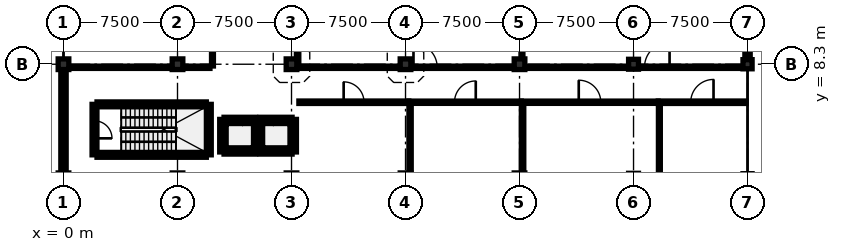
"""IFC4 building model, lengths in metres.
Left out: names, types, materials, properties, quantities, classifications, styles, units other than length and angle.
Written with IfcOpenShell. Run it as: python <this file> out.ifc"""

import sys

from ifc_helpers import new_model, si_unit, direction, frame, frame_2d, origin, origin_2d, place, context, subcontext, project, spatial, rectangle, extrude, element, fill, save


model = new_model("IFC4")
c1 = context("Model", 3, precision=1e-05, world=origin(), true_north=direction((0.0, 1.0)))
c2 = subcontext(c1, "Body", "Model", "MODEL_VIEW")
j1 = project(units=[si_unit("LENGTHUNIT", "METRE"), si_unit("PLANEANGLEUNIT", "RADIAN")], contexts=[c1])
p1 = place(None, origin())
s1 = spatial("IfcSite", under=j1, at=p1, CompositionType="ELEMENT")
p2 = place(p1, origin())
s2 = spatial("IfcBuilding", under=s1, at=p2, CompositionType="ELEMENT")
p3 = place(p2, frame((0.0, 0.0, 5.0)))
s3 = spatial("IfcBuildingStorey", under=s2, at=p3, CompositionType="ELEMENT", Elevation=5.0)
for number, where, z_axis, x_axis in (
    (1, (0.0, 8.3, 0.0), (0.0, 0.0, 1.0), (1.0, 0.0, 0.0)),
    (2, (7.5, 8.3, 0.0), (0.0, 0.0, 1.0), (1.0, 0.0, 0.0)),
    (3, (15.0, 8.3, 0.0), (0.0, 0.0, 1.0), (1.0, 0.0, 0.0)),
    (4, (22.5, 8.3, 0.0), (0.0, 0.0, 1.0), (1.0, 0.0, 0.0)),
    (5, (30.0, 8.3, 0.0), (0.0, 0.0, 1.0), (1.0, 0.0, 0.0)),
):
    element("IfcColumn", number, at=place(p3, frame(where, z_axis=z_axis, x_axis=x_axis)), inside=s3, PredefinedType="COLUMN", context=c2, shape_type="SweptSolid", body=[
        extrude(rectangle(XDim=0.7, YDim=0.7, at=origin_2d()), origin(), (0.0, 0.0, 1.0), 4.2),
    ])
p4 = place(p3, frame((37.5, 8.3, 0.0), z_axis=(0.0, 0.0, 1.0), x_axis=(1.0, 0.0, 0.0)))
e6 = element("IfcColumn", 6, at=p4, inside=s3, PredefinedType="COLUMN", context=c2, shape_type="SweptSolid", body=[
    extrude(rectangle(XDim=0.65, YDim=0.65, at=origin_2d()), origin(), (0.0, 0.0, 1.0), 4.2),
])
p5 = place(p3, frame((45.0, 8.3, 0.0), z_axis=(0.0, 0.0, 1.0), x_axis=(1.0, 0.0, 0.0)))
e7 = element("IfcColumn", 7, at=p5, inside=s3, PredefinedType="COLUMN", context=c2, shape_type="SweptSolid", body=[
    extrude(rectangle(XDim=0.6, YDim=0.6, at=origin_2d()), origin(), (0.0, 0.0, 1.0), 4.2),
])
p6 = place(p3, frame((45.0, 30.5, 0.0), z_axis=(0.0, 0.0, 1.0), x_axis=(0.0, -1.0, 0.0)))
e8 = element("IfcWall", 8, at=p6, inside=s3, PredefinedType="SOLIDWALL", context=c2, shape_type="SweptSolid", body=[
    extrude(rectangle(XDim=21.9, YDim=0.35, at=frame_2d((10.95, 0.0))), origin(), (0.0, 0.0, 1.0), 3.485),
])
p7 = place(p3, frame((0.0, 1.15, 0.0), z_axis=(0.0, 0.0, 1.0), x_axis=(0.0, 1.0, 0.0)))
e9 = element("IfcWall", 9, at=p7, inside=s3, PredefinedType="SOLIDWALL", context=c2, shape_type="SweptSolid", body=[
    extrude(rectangle(XDim=6.8, YDim=0.35, at=frame_2d((3.4, 0.0))), origin(), (0.0, 0.0, 1.0), 3.535),
])
p8 = place(p3, frame((2.205, 2.34, 0.0), z_axis=(0.0, 0.0, 1.0), x_axis=(1.0, 0.0, 0.0)))
e10 = element("IfcWall", 10, at=p8, inside=s3, PredefinedType="SHEAR", context=c2, shape_type="SweptSolid", body=[
    extrude(rectangle(XDim=7.19, YDim=0.32, at=frame_2d((3.595, 0.0))), origin(), (0.0, 0.0, 1.0), 4.2),
])
p9 = place(p3, frame((9.56, 2.34, 0.0), z_axis=(0.0, 0.0, 1.0), x_axis=(0.0, 1.0, 0.0)))
e11 = element("IfcWall", 11, at=p9, inside=s3, PredefinedType="SHEAR", context=c2, shape_type="SweptSolid", body=[
    extrude(rectangle(XDim=3.32, YDim=0.32, at=frame_2d((1.66, 0.0))), origin(), (0.0, 0.0, 1.0), 4.2),
])
p10 = place(p3, frame((9.395, 5.66, 0.0), z_axis=(0.0, 0.0, 1.0), x_axis=(-1.0, 0.0, 0.0)))
e12 = element("IfcWall", 12, at=p10, inside=s3, PredefinedType="SHEAR", context=c2, shape_type="SweptSolid", body=[
    extrude(rectangle(XDim=7.19, YDim=0.32, at=frame_2d((3.595, 0.0))), origin(), (0.0, 0.0, 1.0), 4.2),
])
p11 = place(p3, frame((2.04, 5.66, 0.0), z_axis=(0.0, 0.0, 1.0), x_axis=(0.0, -1.0, 0.0)))
e13 = element("IfcWall", 13, at=p11, inside=s3, PredefinedType="SHEAR", context=c2, shape_type="SweptSolid", body=[
    extrude(rectangle(XDim=3.32, YDim=0.32, at=frame_2d((1.66, 0.0))), origin(), (0.0, 0.0, 1.0), 4.2),
])
p12 = place(p11, frame((1.085, 0.0, 0.0)))
e14 = element("IfcOpeningElement", 14, at=p12, cuts=e13, PredefinedType="OPENING", context=c2, shape_type="SweptSolid", body=[
    extrude(rectangle(XDim=1.15, YDim=2.15, at=frame_2d((0.575, 1.075))), frame((0.0, 0.172, 0.0), z_axis=(0.0, -1.0, 0.0), x_axis=(1.0, 0.0, 0.0)), (0.0, 0.0, 1.0), 0.344),
])
p13 = place(p3, frame((10.562, 2.529, 0.0), z_axis=(0.0, 0.0, 1.0), x_axis=(1.0, 0.0, 0.0)))
e15 = element("IfcWall", 15, at=p13, inside=s3, PredefinedType="SHEAR", context=c2, shape_type="SweptSolid", body=[
    extrude(rectangle(XDim=2.077, YDim=0.28, at=frame_2d((1.039, 0.0))), origin(), (0.0, 0.0, 1.0), 4.2),
])
p14 = place(p3, frame((12.783, 2.529, 0.0), z_axis=(0.0, 0.0, 1.0), x_axis=(0.0, 1.0, 0.0)))
e16 = element("IfcWall", 16, at=p14, inside=s3, PredefinedType="SHEAR", context=c2, shape_type="SweptSolid", body=[
    extrude(rectangle(XDim=2.141, YDim=0.28, at=frame_2d((1.071, 0.0))), origin(), (0.0, 0.0, 1.0), 4.2),
])
p15 = place(p3, frame((12.638, 4.671, 0.0), z_axis=(0.0, 0.0, 1.0), x_axis=(-1.0, 0.0, 0.0)))
e17 = element("IfcWall", 17, at=p15, inside=s3, PredefinedType="SHEAR", context=c2, shape_type="SweptSolid", body=[
    extrude(rectangle(XDim=2.077, YDim=0.28, at=frame_2d((1.039, 0.0))), origin(), (0.0, 0.0, 1.0), 4.2),
])
p16 = place(p15, frame((0.489, 0.0, 0.0)))
e18 = element("IfcOpeningElement", 18, at=p16, cuts=e17, PredefinedType="OPENING", context=c2, shape_type="SweptSolid", body=[
    extrude(rectangle(XDim=1.1, YDim=2.15, at=frame_2d((0.55, 1.075))), frame((0.0, 0.152, 0.0), z_axis=(0.0, -1.0, 0.0), x_axis=(1.0, 0.0, 0.0)), (0.0, 0.0, 1.0), 0.304),
])
p17 = place(p3, frame((10.417, 4.671, 0.0), z_axis=(0.0, 0.0, 1.0), x_axis=(0.0, -1.0, 0.0)))
e19 = element("IfcWall", 19, at=p17, inside=s3, PredefinedType="SHEAR", context=c2, shape_type="SweptSolid", body=[
    extrude(rectangle(XDim=2.141, YDim=0.28, at=frame_2d((1.071, 0.0))), origin(), (0.0, 0.0, 1.0), 4.2),
])
p18 = place(p3, frame((12.928, 2.529, 0.0), z_axis=(0.0, 0.0, 1.0), x_axis=(1.0, 0.0, 0.0)))
e20 = element("IfcWall", 20, at=p18, inside=s3, PredefinedType="SHEAR", context=c2, shape_type="SweptSolid", body=[
    extrude(rectangle(XDim=2.11, YDim=0.28, at=frame_2d((1.055, 0.0))), origin(), (0.0, 0.0, 1.0), 4.2),
])
p19 = place(p3, frame((15.184, 2.529, 0.0), z_axis=(0.0, 0.0, 1.0), x_axis=(0.0, 1.0, 0.0)))
e21 = element("IfcWall", 21, at=p19, inside=s3, PredefinedType="SHEAR", context=c2, shape_type="SweptSolid", body=[
    extrude(rectangle(XDim=2.141, YDim=0.28, at=frame_2d((1.071, 0.0))), origin(), (0.0, 0.0, 1.0), 4.2),
])
p20 = place(p3, frame((15.039, 4.671, 0.0), z_axis=(0.0, 0.0, 1.0), x_axis=(-1.0, 0.0, 0.0)))
e22 = element("IfcWall", 22, at=p20, inside=s3, PredefinedType="SHEAR", context=c2, shape_type="SweptSolid", body=[
    extrude(rectangle(XDim=2.11, YDim=0.28, at=frame_2d((1.055, 0.0))), origin(), (0.0, 0.0, 1.0), 4.2),
])
p21 = place(p20, frame((0.505, 0.0, 0.0)))
e23 = element("IfcOpeningElement", 23, at=p21, cuts=e22, PredefinedType="OPENING", context=c2, shape_type="SweptSolid", body=[
    extrude(rectangle(XDim=1.1, YDim=2.15, at=frame_2d((0.55, 1.075))), frame((0.0, 0.152, 0.0), z_axis=(0.0, -1.0, 0.0), x_axis=(1.0, 0.0, 0.0)), (0.0, 0.0, 1.0), 0.304),
])
p22 = place(p3, frame((15.485, 5.8, 0.0), z_axis=(0.0, 0.0, 1.0), x_axis=(1.0, 0.0, 0.0)))
e24 = element("IfcWall", 24, at=p22, inside=s3, PredefinedType="PARTITIONING", context=c2, shape_type="SweptSolid", body=[
    extrude(rectangle(XDim=7.23, YDim=0.16, at=frame_2d((3.615, 0.0))), origin(), (0.0, 0.0, 1.0), 3.265),
])
p23 = place(p22, frame((2.945, 0.0, 0.0)))
e25 = element("IfcOpeningElement", 25, at=p23, cuts=e24, PredefinedType="OPENING", context=c2, shape_type="SweptSolid", body=[
    extrude(rectangle(XDim=1.34, YDim=2.24, at=frame_2d((0.67, 1.12))), frame((0.0, 0.092, 0.0), z_axis=(0.0, -1.0, 0.0), x_axis=(1.0, 0.0, 0.0)), (0.0, 0.0, 1.0), 0.184),
])
p24 = place(p3, frame((22.727, 5.8, 0.0), z_axis=(0.0, 0.0, 1.0), x_axis=(1.0, 0.0, 0.0)))
e26 = element("IfcWall", 26, at=p24, inside=s3, PredefinedType="PARTITIONING", context=c2, shape_type="SweptSolid", body=[
    extrude(rectangle(XDim=7.388, YDim=0.15, at=frame_2d((3.694, 0.0))), origin(), (0.0, 0.0, 1.0), 3.265),
])
p25 = place(p24, frame((2.994, 0.0, 0.0)))
e27 = element("IfcOpeningElement", 27, at=p25, cuts=e26, PredefinedType="OPENING", context=c2, shape_type="SweptSolid", body=[
    extrude(rectangle(XDim=1.4, YDim=2.25, at=frame_2d((0.7, 1.125))), frame((0.0, 0.087, 0.0), z_axis=(0.0, -1.0, 0.0), x_axis=(1.0, 0.0, 0.0)), (0.0, 0.0, 1.0), 0.174),
])
p26 = place(p3, frame((30.127, 5.8, 0.0), z_axis=(0.0, 0.0, 1.0), x_axis=(1.0, 0.0, 0.0)))
e28 = element("IfcWall", 28, at=p26, inside=s3, PredefinedType="PARTITIONING", context=c2, shape_type="SweptSolid", body=[
    extrude(rectangle(XDim=8.988, YDim=0.15, at=frame_2d((4.494, 0.0))), origin(), (0.0, 0.0, 1.0), 3.485),
])
p27 = place(p26, frame((3.769, 0.0, 0.0)))
e29 = element("IfcOpeningElement", 29, at=p27, cuts=e28, PredefinedType="OPENING", context=c2, shape_type="SweptSolid", body=[
    extrude(rectangle(XDim=1.45, YDim=2.26, at=frame_2d((0.725, 1.13))), frame((0.0, 0.087, 0.0), z_axis=(0.0, -1.0, 0.0), x_axis=(1.0, 0.0, 0.0)), (0.0, 0.0, 1.0), 0.174),
])
p28 = place(p3, frame((39.127, 5.8, 0.0), z_axis=(0.0, 0.0, 1.0), x_axis=(1.0, 0.0, 0.0)))
e30 = element("IfcWall", 30, at=p28, inside=s3, PredefinedType="PARTITIONING", context=c2, shape_type="SweptSolid", body=[
    extrude(rectangle(XDim=5.771, YDim=0.16, at=frame_2d((2.885, 0.0))), origin(), (0.0, 0.0, 1.0), 3.535),
])
p29 = place(p28, frame((2.135, 0.0, 0.0)))
e31 = element("IfcOpeningElement", 31, at=p29, cuts=e30, PredefinedType="OPENING", context=c2, shape_type="SweptSolid", body=[
    extrude(rectangle(XDim=1.5, YDim=2.28, at=frame_2d((0.75, 1.14))), frame((0.0, 0.092, 0.0), z_axis=(0.0, -1.0, 0.0), x_axis=(1.0, 0.0, 0.0)), (0.0, 0.0, 1.0), 0.184),
])
p30 = place(p3, frame((15.362, 8.1, 0.0), z_axis=(0.0, 0.0, 1.0), x_axis=(1.0, 0.0, 0.0)))
e32 = element("IfcWall", 32, at=p30, inside=s3, PredefinedType="PARTITIONING", context=c2, shape_type="SweptSolid", body=[
    extrude(rectangle(XDim=14.546, YDim=0.15, at=frame_2d((7.273, 0.0))), origin(), (0.0, 0.0, 1.0), 3.265),
])
p31 = place(p30, frame((7.662, 0.0, 0.0)))
e33 = element("IfcOpeningElement", 33, at=p31, cuts=e32, PredefinedType="OPENING", context=c2, shape_type="SweptSolid", body=[
    extrude(rectangle(XDim=1.56, YDim=2.3, at=frame_2d((0.78, 1.15))), frame((0.0, 0.087, 0.0), z_axis=(0.0, -1.0, 0.0), x_axis=(1.0, 0.0, 0.0)), (0.0, 0.0, 1.0), 0.174),
])
p32 = place(p3, frame((30.362, 8.1, 0.0), z_axis=(0.0, 0.0, 1.0), x_axis=(1.0, 0.0, 0.0)))
e34 = element("IfcWall", 34, at=p32, inside=s3, PredefinedType="PARTITIONING", context=c2, shape_type="SweptSolid", body=[
    extrude(rectangle(XDim=14.326, YDim=0.15, at=frame_2d((7.163, 0.0))), origin(), (0.0, 0.0, 1.0), 3.485),
])
p33 = place(p32, frame((7.859, 0.0, 0.0)))
e35 = element("IfcOpeningElement", 35, at=p33, cuts=e34, PredefinedType="OPENING", context=c2, shape_type="SweptSolid", body=[
    extrude(rectangle(XDim=1.65, YDim=2.32, at=frame_2d((0.825, 1.16))), frame((0.0, 0.087, 0.0), z_axis=(0.0, -1.0, 0.0), x_axis=(1.0, 0.0, 0.0)), (0.0, 0.0, 1.0), 0.174),
])
p34 = place(p3, frame((9.8, 8.185, 0.0), z_axis=(0.0, 0.0, 1.0), x_axis=(0.0, 1.0, 0.0)))
e36 = element("IfcWall", 36, at=p34, inside=s3, PredefinedType="PARTITIONING", context=c2, shape_type="SweptSolid", body=[
    extrude(rectangle(XDim=6.93, YDim=0.125, at=frame_2d((3.465, 0.0))), origin(), (0.0, 0.0, 1.0), 3.265),
])
p35 = place(p34, frame((2.94, 0.0, 0.0)))
e37 = element("IfcOpeningElement", 37, at=p35, cuts=e36, PredefinedType="OPENING", context=c2, shape_type="SweptSolid", body=[
    extrude(rectangle(XDim=1.05, YDim=2.15, at=frame_2d((0.525, 1.075))), frame((0.0, 0.074, 0.0), z_axis=(0.0, -1.0, 0.0), x_axis=(1.0, 0.0, 0.0)), (0.0, 0.0, 1.0), 0.149),
])
p36 = place(p3, frame((22.8, 1.162, 0.0), z_axis=(0.0, 0.0, 1.0), x_axis=(0.0, 1.0, 0.0)))
e38 = element("IfcWall", 38, at=p36, inside=s3, PredefinedType="PARTITIONING", context=c2, shape_type="SweptSolid", body=[
    extrude(rectangle(XDim=4.551, YDim=0.15, at=frame_2d((2.275, 0.0))), origin(), (0.0, 0.0, 1.0), 3.265),
])
p37 = place(p3, frame((30.2, 1.162, 0.0), z_axis=(0.0, 0.0, 1.0), x_axis=(0.0, 1.0, 0.0)))
e39 = element("IfcWall", 39, at=p37, inside=s3, PredefinedType="PARTITIONING", context=c2, shape_type="SweptSolid", body=[
    extrude(rectangle(XDim=4.551, YDim=0.16, at=frame_2d((2.275, 0.0))), origin(), (0.0, 0.0, 1.0), 3.485),
])
p38 = place(p3, frame((39.2, 0.987, 0.0), z_axis=(0.0, 0.0, 1.0), x_axis=(0.0, 1.0, 0.0)))
e40 = element("IfcWall", 40, at=p38, inside=s3, PredefinedType="PARTITIONING", context=c2, shape_type="SweptSolid", body=[
    extrude(rectangle(XDim=4.721, YDim=0.125, at=frame_2d((2.36, 0.0))), origin(), (0.0, 0.0, 1.0), 3.535),
])
p39 = place(p3, frame((15.4, 8.187, 0.0), z_axis=(0.0, 0.0, 1.0), x_axis=(0.0, 1.0, 0.0)))
e41 = element("IfcWall", 41, at=p39, inside=s3, PredefinedType="PARTITIONING", context=c2, shape_type="SweptSolid", body=[
    extrude(rectangle(XDim=5.948, YDim=0.16, at=frame_2d((2.974, 0.0))), origin(), (0.0, 0.0, 1.0), 3.265),
])
p40 = place(p3, frame((30.16, 8.432, 0.0), z_axis=(0.0, 0.0, 1.0), x_axis=(0.0, 1.0, 0.0)))
e42 = element("IfcWall", 42, at=p40, inside=s3, PredefinedType="PARTITIONING", context=c2, shape_type="SweptSolid", body=[
    extrude(rectangle(XDim=5.776, YDim=0.125, at=frame_2d((2.888, 0.0))), origin(), (0.0, 0.0, 1.0), 3.485),
])
p41 = place(p3, frame((0.362, 8.1, 0.0), z_axis=(0.0, 0.0, 1.0), x_axis=(1.0, 0.0, 0.0)))
e43 = element("IfcWall", 43, at=p41, inside=s3, PredefinedType="PARTITIONING", context=c2, shape_type="SweptSolid", body=[
    extrude(rectangle(XDim=9.273, YDim=0.15, at=frame_2d((4.636, 0.0))), origin(), (0.0, 0.0, 1.0), 3.265),
])
p42 = place(p12, origin())
e44 = element("IfcDoor", 44, at=p42, inside=s3, OperationType="SINGLE_SWING_RIGHT", PredefinedType="DOOR", context=c2, shape_type="SweptSolid", body=[
    extrude(rectangle(XDim=1.15, YDim=2.15, at=frame_2d((0.575, 1.075))), frame((0.0, 0.025, 0.0), z_axis=(0.0, -1.0, 0.0), x_axis=(1.0, 0.0, 0.0)), (0.0, 0.0, 1.0), 0.05),
])
fill(e14, e44)
p43 = place(p16, origin())
e45 = element("IfcDoor", 45, at=p43, inside=s3, OperationType="SLIDING_TO_LEFT", PredefinedType="DOOR", context=c2, shape_type="SweptSolid", body=[
    extrude(rectangle(XDim=1.1, YDim=2.15, at=frame_2d((0.55, 1.075))), frame((0.0, 0.025, 0.0), z_axis=(0.0, -1.0, 0.0), x_axis=(1.0, 0.0, 0.0)), (0.0, 0.0, 1.0), 0.05),
])
fill(e18, e45)
p44 = place(p21, origin())
e46 = element("IfcDoor", 46, at=p44, inside=s3, OperationType="SLIDING_TO_RIGHT", PredefinedType="DOOR", context=c2, shape_type="SweptSolid", body=[
    extrude(rectangle(XDim=1.1, YDim=2.15, at=frame_2d((0.55, 1.075))), frame((0.0, 0.025, 0.0), z_axis=(0.0, -1.0, 0.0), x_axis=(1.0, 0.0, 0.0)), (0.0, 0.0, 1.0), 0.05),
])
fill(e23, e46)
p45 = place(p23, origin())
e47 = element("IfcDoor", 47, at=p45, inside=s3, OperationType="SINGLE_SWING_LEFT", PredefinedType="DOOR", context=c2, shape_type="SweptSolid", body=[
    extrude(rectangle(XDim=1.34, YDim=2.24, at=frame_2d((0.67, 1.12))), frame((0.0, 0.025, 0.0), z_axis=(0.0, -1.0, 0.0), x_axis=(1.0, 0.0, 0.0)), (0.0, 0.0, 1.0), 0.05),
])
fill(e25, e47)
p46 = place(p25, origin())
e48 = element("IfcDoor", 48, at=p46, inside=s3, OperationType="SINGLE_SWING_RIGHT", PredefinedType="DOOR", context=c2, shape_type="SweptSolid", body=[
    extrude(rectangle(XDim=1.4, YDim=2.25, at=frame_2d((0.7, 1.125))), frame((0.0, 0.025, 0.0), z_axis=(0.0, -1.0, 0.0), x_axis=(1.0, 0.0, 0.0)), (0.0, 0.0, 1.0), 0.05),
])
fill(e27, e48)
p47 = place(p27, origin())
e49 = element("IfcDoor", 49, at=p47, inside=s3, OperationType="SINGLE_SWING_LEFT", PredefinedType="DOOR", context=c2, shape_type="SweptSolid", body=[
    extrude(rectangle(XDim=1.45, YDim=2.26, at=frame_2d((0.725, 1.13))), frame((0.0, 0.025, 0.0), z_axis=(0.0, -1.0, 0.0), x_axis=(1.0, 0.0, 0.0)), (0.0, 0.0, 1.0), 0.05),
])
fill(e29, e49)
p48 = place(p29, origin())
e50 = element("IfcDoor", 50, at=p48, inside=s3, OperationType="SINGLE_SWING_RIGHT", PredefinedType="DOOR", context=c2, shape_type="SweptSolid", body=[
    extrude(rectangle(XDim=1.5, YDim=2.28, at=frame_2d((0.75, 1.14))), frame((0.0, 0.025, 0.0), z_axis=(0.0, -1.0, 0.0), x_axis=(1.0, 0.0, 0.0)), (0.0, 0.0, 1.0), 0.05),
])
fill(e31, e50)
p49 = place(p31, origin())
e51 = element("IfcDoor", 51, at=p49, inside=s3, OperationType="SINGLE_SWING_LEFT", PredefinedType="DOOR", context=c2, shape_type="SweptSolid", body=[
    extrude(rectangle(XDim=1.56, YDim=2.3, at=frame_2d((0.78, 1.15))), frame((0.0, 0.025, 0.0), z_axis=(0.0, -1.0, 0.0), x_axis=(1.0, 0.0, 0.0)), (0.0, 0.0, 1.0), 0.05),
])
fill(e33, e51)
p50 = place(p33, origin())
e52 = element("IfcDoor", 52, at=p50, inside=s3, OperationType="SINGLE_SWING_RIGHT", PredefinedType="DOOR", context=c2, shape_type="SweptSolid", body=[
    extrude(rectangle(XDim=1.65, YDim=2.32, at=frame_2d((0.825, 1.16))), frame((0.0, 0.025, 0.0), z_axis=(0.0, -1.0, 0.0), x_axis=(1.0, 0.0, 0.0)), (0.0, 0.0, 1.0), 0.05),
])
fill(e35, e52)
save(model, sys.argv[1])
